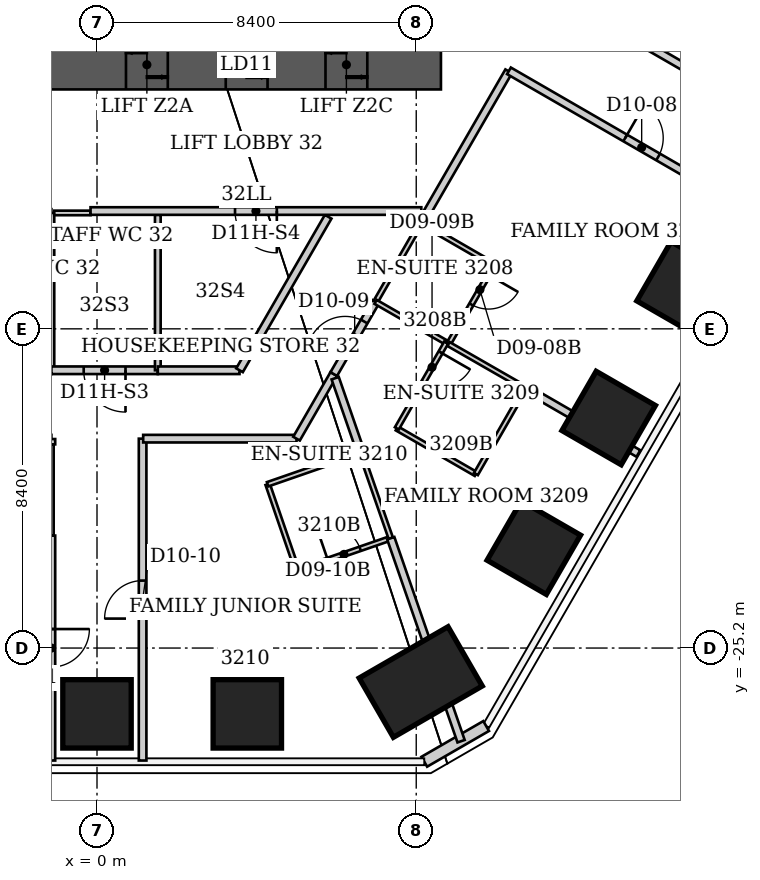
"""IFC4 building model, lengths in metres.
Left out: names, types, materials, properties, quantities, classifications, styles, units other than length and angle.
Written with IfcOpenShell. Run it as: python <this file> out.ifc"""

import sys

from ifc_helpers import new_model, si_unit, direction, frame, frame_2d, origin, origin_2d, place, context, subcontext, project, spatial, rectangle, extrude, element, fill, save


model = new_model("IFC4")
c1 = context("Model", 3, precision=1e-05, world=origin(), true_north=direction((0.0, 1.0)))
c2 = subcontext(c1, "Body", "Model", "MODEL_VIEW")
j1 = project(units=[si_unit("LENGTHUNIT", "METRE"), si_unit("PLANEANGLEUNIT", "RADIAN")], contexts=[c1])
p1 = place(None, origin())
s1 = spatial("IfcSite", under=j1, at=p1, CompositionType="ELEMENT")
p2 = place(p1, origin())
s2 = spatial("IfcBuilding", under=s1, at=p2, CompositionType="ELEMENT")
p3 = place(p2, frame((0.0, 0.0, 131.0)))
s3 = spatial("IfcBuildingStorey", under=s2, at=p3, CompositionType="ELEMENT", Elevation=131.0)
for number, where, z_axis, x_axis in (
    (1, (15.434, -15.735, 0.0), (0.0, 0.0, 1.0), (0.866, -0.5, 0.0)),
    (2, (13.464, -19.147, 0.0), (0.0, 0.0, 1.0), (0.866, -0.5, 0.0)),
    (3, (11.494, -22.559, 0.0), (0.0, 0.0, 1.0), (0.866, -0.5, 0.0)),
):
    element("IfcColumn", number, at=place(p3, frame(where, z_axis=z_axis, x_axis=x_axis)), inside=s3, PredefinedType="COLUMN", context=c2, shape_type="SweptSolid", body=[
        extrude(rectangle(XDim=1.8, YDim=1.8, at=origin_2d()), origin(), (0.0, 0.0, 1.0), 3.8),
    ])
p4 = place(p3, frame((8.518, -26.094, 0.0), z_axis=(0.0, 0.0, 1.0), x_axis=(0.5, -0.866025403784, 0.0)))
e4 = element("IfcColumn", 4, at=p4, inside=s3, PredefinedType="COLUMN", context=c2, shape_type="SweptSolid", body=[
    extrude(rectangle(XDim=1.8, YDim=2.7, at=origin_2d()), origin(), (0.0, 0.0, 1.0), 3.8),
])
for number, where, z_axis, x_axis in (
    (5, (3.955, -26.932, 0.0), (0.0, 0.0, 1.0), (0.0, -1.0, 0.0)),
    (6, (0.0, -26.932, 0.0), (0.0, 0.0, 1.0), (0.0, -1.0, 0.0)),
):
    element("IfcColumn", number, at=place(p3, frame(where, z_axis=z_axis, x_axis=x_axis)), inside=s3, PredefinedType="COLUMN", context=c2, shape_type="SweptSolid", body=[
        extrude(rectangle(XDim=1.8, YDim=1.8, at=origin_2d()), origin(), (0.0, 0.0, 1.0), 3.8),
    ])
p5 = place(p3, frame((-9.05, -9.85, 0.0), z_axis=(0.0, 0.0, 1.0), x_axis=(1.0, 0.0, 0.0)))
e7 = element("IfcWall", 7, at=p5, inside=s3, PredefinedType="SHEAR", context=c2, shape_type="SweptSolid", body=[
    extrude(rectangle(XDim=18.1, YDim=1.3, at=frame_2d((9.05, 0.0))), origin(), (0.0, 0.0, 1.0), 3.8),
])
p6 = place(p5, frame((1.938, 0.0, 0.0)))
e8 = element("IfcOpeningElement", 8, at=p6, cuts=e7, PredefinedType="OPENING", context=c2, shape_type="SweptSolid", body=[
    extrude(rectangle(XDim=1.1, YDim=2.2, at=frame_2d((0.55, 1.1))), frame((0.0, 0.65, 0.0), z_axis=(0.0, -1.0, 0.0), x_axis=(1.0, 0.0, 0.0)), (0.0, 0.0, 1.0), 1.3),
])
p7 = place(p5, frame((9.812, 0.0, 0.0)))
e9 = element("IfcOpeningElement", 9, at=p7, cuts=e7, PredefinedType="OPENING", context=c2, shape_type="SweptSolid", body=[
    extrude(rectangle(XDim=1.1, YDim=2.1, at=frame_2d((0.55, 1.05))), frame((0.0, 0.65, 0.0), z_axis=(0.0, -1.0, 0.0), x_axis=(1.0, 0.0, 0.0)), (0.0, 0.0, 1.0), 1.3),
])
p8 = place(p5, frame((12.438, 0.0, 0.0)))
e10 = element("IfcOpeningElement", 10, at=p8, cuts=e7, PredefinedType="OPENING", context=c2, shape_type="SweptSolid", body=[
    extrude(rectangle(XDim=1.1, YDim=2.1, at=frame_2d((0.55, 1.05))), frame((0.0, 0.65, 0.0), z_axis=(0.0, -1.0, 0.0), x_axis=(1.0, 0.0, 0.0)), (0.0, 0.0, 1.0), 1.3),
])
p9 = place(p5, frame((15.062, 0.0, 0.0)))
e11 = element("IfcOpeningElement", 11, at=p9, cuts=e7, PredefinedType="OPENING", context=c2, shape_type="SweptSolid", body=[
    extrude(rectangle(XDim=1.1, YDim=2.1, at=frame_2d((0.55, 1.05))), frame((0.0, 0.65, 0.0), z_axis=(0.0, -1.0, 0.0), x_axis=(1.0, 0.0, 0.0)), (0.0, 0.0, 1.0), 1.3),
])
p10 = place(p3, frame((10.24, -27.252, 0.0), z_axis=(0.0, 0.0, 1.0), x_axis=(-0.866045024864, -0.499966013754, 0.0)))
e12 = element("IfcWall", 12, at=p10, inside=s3, PredefinedType="SOLIDWALL", context=c2, shape_type="SweptSolid", body=[
    extrude(rectangle(XDim=1.88, YDim=0.3, at=frame_2d((0.94, 0.0))), origin(), (0.0, 0.0, 1.0), 3.64),
])
p11 = place(p3, frame((-1.2, -22.24, 0.0), z_axis=(0.0, 0.0, 1.0), x_axis=(0.0, -1.0, 0.0)))
e13 = element("IfcWall", 13, at=p11, inside=s3, PredefinedType="PARTITIONING", context=c2, shape_type="SweptSolid", body=[
    extrude(rectangle(XDim=5.92, YDim=0.2, at=frame_2d((2.96, 0.0))), origin(), (0.0, 0.0, 1.0), 3.64),
])
p12 = place(p11, frame((2.46, 0.0, 0.0)))
e14 = element("IfcOpeningElement", 14, at=p12, cuts=e13, PredefinedType="OPENING", context=c2, shape_type="SweptSolid", body=[
    extrude(rectangle(XDim=1.0, YDim=2.13, at=frame_2d((0.5, 1.065))), frame((0.0, 0.1, 0.0), z_axis=(0.0, -1.0, 0.0), x_axis=(1.0, 0.0, 0.0)), (0.0, 0.0, 1.0), 0.2),
])
p13 = place(p3, frame((-1.2, -19.84, 0.0), z_axis=(0.0, 0.0, 1.0), x_axis=(0.0, -1.0, 0.0)))
e15 = element("IfcWall", 15, at=p13, inside=s3, PredefinedType="PARTITIONING", context=c2, shape_type="SweptSolid", body=[
    extrude(rectangle(XDim=2.4, YDim=0.12, at=frame_2d((1.2, 0.0))), origin(), (0.0, 0.0, 1.0), 3.64),
])
p14 = place(p3, frame((-1.2, -19.7, 0.0), z_axis=(0.0, 0.0, 1.0), x_axis=(0.0, -1.0, 0.0)))
e16 = element("IfcWall", 16, at=p14, inside=s3, PredefinedType="PARTITIONING", context=c2, shape_type="SweptSolid", body=[
    extrude(rectangle(XDim=0.14, YDim=0.2, at=frame_2d((0.07, 0.0))), origin(), (0.0, 0.0, 1.0), 3.64),
])
p15 = place(p3, frame((-1.2, -13.75, 0.0), z_axis=(0.0, 0.0, 1.0), x_axis=(0.0, -1.0, 0.0)))
e17 = element("IfcWall", 17, at=p15, inside=s3, PredefinedType="PARTITIONING", context=c2, shape_type="SweptSolid", body=[
    extrude(rectangle(XDim=4.14, YDim=0.15, at=frame_2d((2.07, 0.0))), origin(), (0.0, 0.0, 1.0), 3.64),
])
p16 = place(p3, frame((-1.125, -13.75, 0.0), z_axis=(0.0, 0.0, 1.0), x_axis=(1.0, 0.0, 0.0)))
e18 = element("IfcWall", 18, at=p16, inside=s3, PredefinedType="PARTITIONING", context=c2, shape_type="SweptSolid", body=[
    extrude(rectangle(XDim=0.955, YDim=0.12, at=frame_2d((0.478, 0.0))), origin(), (0.0, 0.0, 1.0), 3.64),
])
p17 = place(p3, frame((1.2, -28.16, 0.0), z_axis=(0.0, 0.0, 1.0), x_axis=(0.0, 1.0, 0.0)))
e19 = element("IfcWall", 19, at=p17, inside=s3, PredefinedType="PARTITIONING", context=c2, shape_type="SweptSolid", body=[
    extrude(rectangle(XDim=8.47, YDim=0.2, at=frame_2d((4.235, 0.0))), origin(), (0.0, 0.0, 1.0), 3.64),
])
p18 = place(p17, frame((3.735, 0.0, 0.0)))
e20 = element("IfcOpeningElement", 20, at=p18, cuts=e19, PredefinedType="OPENING", context=c2, shape_type="SweptSolid", body=[
    extrude(rectangle(XDim=1.0, YDim=2.13, at=frame_2d((0.5, 1.065))), frame((0.0, 0.1, 0.0), z_axis=(0.0, -1.0, 0.0), x_axis=(1.0, 0.0, 0.0)), (0.0, 0.0, 1.0), 0.2),
])
p19 = place(p3, frame((1.215, -19.69, 0.0), z_axis=(0.0, 0.0, 1.0), x_axis=(1.0, 0.0, 0.0)))
e21 = element("IfcWall", 21, at=p19, inside=s3, PredefinedType="PARTITIONING", context=c2, shape_type="SweptSolid", body=[
    extrude(rectangle(XDim=4.035, YDim=0.2, at=frame_2d((2.018, 0.0))), origin(), (0.0, 0.0, 1.0), 3.64),
])
p20 = place(p3, frame((1.6, -17.89, 0.0), z_axis=(0.0, 0.0, 1.0), x_axis=(-1.0, 0.0, 0.0)))
e22 = element("IfcWall", 22, at=p20, inside=s3, PredefinedType="PARTITIONING", context=c2, shape_type="SweptSolid", body=[
    extrude(rectangle(XDim=2.8, YDim=0.2, at=frame_2d((1.4, 0.0))), origin(), (0.0, 0.0, 1.0), 3.64),
])
p21 = place(p20, frame((0.85, 0.0, 0.0)))
e23 = element("IfcOpeningElement", 23, at=p21, cuts=e22, PredefinedType="OPENING", context=c2, shape_type="SweptSolid", body=[
    extrude(rectangle(XDim=1.1, YDim=2.2, at=frame_2d((0.55, 1.1))), frame((0.0, 0.1, 0.0), z_axis=(0.0, -1.0, 0.0), x_axis=(1.0, 0.0, 0.0)), (0.0, 0.0, 1.0), 0.2),
])
p22 = place(p3, frame((1.6, -13.8, 0.0), z_axis=(0.0, 0.0, 1.0), x_axis=(0.0, -1.0, 0.0)))
e24 = element("IfcWall", 24, at=p22, inside=s3, PredefinedType="PARTITIONING", context=c2, shape_type="SweptSolid", body=[
    extrude(rectangle(XDim=4.09, YDim=0.15, at=frame_2d((2.045, 0.0))), origin(), (0.0, 0.0, 1.0), 3.64),
])
p23 = place(p3, frame((3.75, -17.89, 0.0), z_axis=(0.0, 0.0, 1.0), x_axis=(-1.0, 0.0, 0.0)))
e25 = element("IfcWall", 25, at=p23, inside=s3, PredefinedType="PARTITIONING", context=c2, shape_type="SweptSolid", body=[
    extrude(rectangle(XDim=2.15, YDim=0.2, at=frame_2d((1.075, 0.0))), origin(), (0.0, 0.0, 1.0), 3.64),
])
p24 = place(p3, frame((4.49, -20.89, 0.0), z_axis=(0.0, 0.0, 1.0), x_axis=(0.324971746724, -0.945723724896, 0.0)))
e26 = element("IfcWall", 26, at=p24, inside=s3, PredefinedType="PARTITIONING", context=c2, shape_type="SweptSolid", body=[
    extrude(rectangle(XDim=2.4, YDim=0.12, at=frame_2d((1.2, 0.0))), origin(), (0.0, 0.0, 1.0), 3.64),
])
p25 = place(p3, frame((5.25, -19.69, 0.0), z_axis=(0.0, 0.0, 1.0), x_axis=(0.499431599995, 0.866353321068, 0.0)))
e27 = element("IfcWall", 27, at=p25, inside=s3, PredefinedType="PARTITIONING", context=c2, shape_type="SweptSolid", body=[
    extrude(rectangle(XDim=1.962, YDim=0.2, at=frame_2d((0.981, 0.0))), origin(), (0.0, 0.0, 1.0), 3.64),
])
p26 = place(p3, frame((5.27, -23.16, 0.0), z_axis=(0.0, 0.0, 1.0), x_axis=(0.945184415197, 0.326537013627, 0.0)))
e28 = element("IfcWall", 28, at=p26, inside=s3, PredefinedType="PARTITIONING", context=c2, shape_type="SweptSolid", body=[
    extrude(rectangle(XDim=2.603, YDim=0.12, at=frame_2d((1.301, 0.0))), origin(), (0.0, 0.0, 1.0), 3.64),
])
p27 = place(p26, frame((0.85, 0.0, 0.0)))
e29 = element("IfcOpeningElement", 29, at=p27, cuts=e28, PredefinedType="OPENING", context=c2, shape_type="SweptSolid", body=[
    extrude(rectangle(XDim=0.9, YDim=2.03, at=frame_2d((0.45, 1.015))), frame((0.0, 0.06, 0.0), z_axis=(0.0, -1.0, 0.0), x_axis=(1.0, 0.0, 0.0)), (0.0, 0.0, 1.0), 0.12),
])
p28 = place(p3, frame((6.083, -13.85, 0.0), z_axis=(0.0, 0.0, 1.0), x_axis=(-0.499977643516, -0.866038310922, 0.0)))
e30 = element("IfcWall", 30, at=p28, inside=s3, PredefinedType="PARTITIONING", context=c2, shape_type="SweptSolid", body=[
    extrude(rectangle(XDim=4.665, YDim=0.2, at=frame_2d((2.333, 0.0))), origin(), (0.0, 0.0, 1.0), 3.64),
])
p29 = place(p3, frame((6.23, -17.99, 0.0), z_axis=(0.0, 0.0, 1.0), x_axis=(0.500957366999, 0.865471961677, 0.0)))
e31 = element("IfcWall", 31, at=p29, inside=s3, PredefinedType="PARTITIONING", context=c2, shape_type="SweptSolid", body=[
    extrude(rectangle(XDim=2.196, YDim=0.2, at=frame_2d((1.098, 0.0))), origin(), (0.0, 0.0, 1.0), 3.64),
])
p30 = place(p29, frame((0.598, 0.0, 0.0)))
e32 = element("IfcOpeningElement", 32, at=p30, cuts=e31, PredefinedType="OPENING", context=c2, shape_type="SweptSolid", body=[
    extrude(rectangle(XDim=1.0, YDim=2.13, at=frame_2d((0.5, 1.065))), frame((0.0, 0.1, 0.0), z_axis=(0.0, -1.0, 0.0), x_axis=(1.0, 0.0, 0.0)), (0.0, 0.0, 1.0), 0.2),
])
p31 = place(p3, frame((6.268, -18.099, 0.0), z_axis=(0.0, 0.0, 1.0), x_axis=(0.327257488288, -0.944935202202, 0.0)))
e33 = element("IfcWall", 33, at=p31, inside=s3, PredefinedType="PARTITIONING", context=c2, shape_type="SweptSolid", body=[
    extrude(rectangle(XDim=2.054, YDim=0.2, at=frame_2d((1.027, 0.0))), origin(), (0.0, 0.0, 1.0), 3.64),
])
p32 = place(p3, frame((6.94, -20.04, 0.0), z_axis=(0.0, 0.0, 1.0), x_axis=(-0.944772080486, -0.327728112822, 0.0)))
e34 = element("IfcWall", 34, at=p32, inside=s3, PredefinedType="PARTITIONING", context=c2, shape_type="SweptSolid", body=[
    extrude(rectangle(XDim=2.593, YDim=0.12, at=frame_2d((1.297, 0.0))), origin(), (0.0, 0.0, 1.0), 3.64),
])
p33 = place(p3, frame((6.94, -20.04, 0.0), z_axis=(0.0, 0.0, 1.0), x_axis=(0.328693963496, -0.944436487203, 0.0)))
e35 = element("IfcWall", 35, at=p33, inside=s3, PredefinedType="PARTITIONING", context=c2, shape_type="SweptSolid", body=[
    extrude(rectangle(XDim=2.404, YDim=0.12, at=frame_2d((1.202, 0.0))), origin(), (0.0, 0.0, 1.0), 3.64),
])
p34 = place(p3, frame((7.33, -16.09, 0.0), z_axis=(0.0, 0.0, 1.0), x_axis=(0.498475244549, 0.866903933877, 0.0)))
e36 = element("IfcWall", 36, at=p34, inside=s3, PredefinedType="PARTITIONING", context=c2, shape_type="SweptSolid", body=[
    extrude(rectangle(XDim=2.227, YDim=0.12, at=frame_2d((1.113, 0.0))), origin(), (0.0, 0.0, 1.0), 3.64),
])
p35 = place(p3, frame((7.33, -16.09, 0.0), z_axis=(0.0, 0.0, 1.0), x_axis=(0.866825160608, -0.498612214989, 0.0)))
e37 = element("IfcWall", 37, at=p35, inside=s3, PredefinedType="PARTITIONING", context=c2, shape_type="SweptSolid", body=[
    extrude(rectangle(XDim=2.146, YDim=0.12, at=frame_2d((1.073, 0.0))), origin(), (0.0, 0.0, 1.0), 3.64),
])
p36 = place(p3, frame((7.73, -22.31, 0.0), z_axis=(0.0, 0.0, 1.0), x_axis=(0.327284111977, -0.944925981253, 0.0)))
e38 = element("IfcWall", 38, at=p36, inside=s3, PredefinedType="PARTITIONING", context=c2, shape_type="SweptSolid", body=[
    extrude(rectangle(XDim=5.653, YDim=0.2, at=frame_2d((2.826, 0.0))), origin(), (0.0, 0.0, 1.0), 3.64),
])
p37 = place(p3, frame((7.89, -19.42, 0.0), z_axis=(0.0, 0.0, 1.0), x_axis=(0.866202511239, -0.499693115345, 0.0)))
e39 = element("IfcWall", 39, at=p37, inside=s3, PredefinedType="PARTITIONING", context=c2, shape_type="SweptSolid", body=[
    extrude(rectangle(XDim=2.401, YDim=0.12, at=frame_2d((1.201, 0.0))), origin(), (0.0, 0.0, 1.0), 3.64),
])
p38 = place(p3, frame((8.44, -14.16, 0.0), z_axis=(0.0, 0.0, 1.0), x_axis=(0.515111490125, 0.857123184111, 0.0)))
e40 = element("IfcWall", 40, at=p38, inside=s3, PredefinedType="PARTITIONING", context=c2, shape_type="SweptSolid", body=[
    extrude(rectangle(XDim=0.175, YDim=0.12, at=frame_2d((0.087, 0.0))), origin(), (0.0, 0.0, 1.0), 3.64),
])
p39 = place(p3, frame((8.53, -14.01, 0.0), z_axis=(0.0, 0.0, 1.0), x_axis=(0.500091179446, 0.865972754907, 0.0)))
e41 = element("IfcWall", 41, at=p39, inside=s3, PredefinedType="PARTITIONING", context=c2, shape_type="SweptSolid", body=[
    extrude(rectangle(XDim=4.604, YDim=0.2, at=frame_2d((2.302, 0.0))), origin(), (0.0, 0.0, 1.0), 3.64),
])
p40 = place(p3, frame((8.534, -13.7, 0.0), z_axis=(0.0, 0.0, 1.0), x_axis=(-1.0, 0.0, 0.0)))
e42 = element("IfcWall", 42, at=p40, inside=s3, PredefinedType="PARTITIONING", context=c2, shape_type="SweptSolid", body=[
    extrude(rectangle(XDim=8.704, YDim=0.2, at=frame_2d((4.352, 0.0))), origin(), (0.0, 0.0, 1.0), 3.64),
])
p41 = place(p40, frame((3.802, 0.0, 0.0)))
e43 = element("IfcOpeningElement", 43, at=p41, cuts=e42, PredefinedType="OPENING", context=c2, shape_type="SweptSolid", body=[
    extrude(rectangle(XDim=1.1, YDim=2.2, at=frame_2d((0.55, 1.1))), frame((0.0, 0.1, 0.0), z_axis=(0.0, -1.0, 0.0), x_axis=(1.0, 0.0, 0.0)), (0.0, 0.0, 1.0), 0.2),
])
p42 = place(p3, frame((9.19, -17.16, 0.0), z_axis=(0.0, 0.0, 1.0), x_axis=(-0.498627694264, -0.866816256489, 0.0)))
e44 = element("IfcWall", 44, at=p42, inside=s3, PredefinedType="PARTITIONING", context=c2, shape_type="SweptSolid", body=[
    extrude(rectangle(XDim=2.607, YDim=0.12, at=frame_2d((1.304, 0.0))), origin(), (0.0, 0.0, 1.0), 3.64),
])
p43 = place(p42, frame((0.3, 0.0, 0.0)))
e45 = element("IfcOpeningElement", 45, at=p43, cuts=e44, PredefinedType="OPENING", context=c2, shape_type="SweptSolid", body=[
    extrude(rectangle(XDim=0.9, YDim=2.03, at=frame_2d((0.45, 1.015))), frame((0.0, 0.06, 0.0), z_axis=(0.0, -1.0, 0.0), x_axis=(1.0, 0.0, 0.0)), (0.0, 0.0, 1.0), 0.12),
])
p44 = place(p3, frame((9.25, -17.2, 0.0), z_axis=(0.0, 0.0, 1.0), x_axis=(0.499737123639, 0.866177122335, 0.0)))
e46 = element("IfcWall", 46, at=p44, inside=s3, PredefinedType="PARTITIONING", context=c2, shape_type="SweptSolid", body=[
    extrude(rectangle(XDim=2.401, YDim=0.12, at=frame_2d((1.201, 0.0))), origin(), (0.0, 0.0, 1.0), 3.64),
])
p45 = place(p44, frame((1.201, 0.0, 0.0)))
e47 = element("IfcOpeningElement", 47, at=p45, cuts=e46, PredefinedType="OPENING", context=c2, shape_type="SweptSolid", body=[
    extrude(rectangle(XDim=0.9, YDim=2.03, at=frame_2d((0.45, 1.015))), frame((0.0, 0.06, 0.0), z_axis=(0.0, -1.0, 0.0), x_axis=(1.0, 0.0, 0.0)), (0.0, 0.0, 1.0), 0.12),
])
p46 = place(p3, frame((9.25, -17.2, 0.0), z_axis=(0.0, 0.0, 1.0), x_axis=(0.867157547908, -0.498033921641, 0.0)))
e48 = element("IfcWall", 48, at=p46, inside=s3, PredefinedType="PARTITIONING", context=c2, shape_type="SweptSolid", body=[
    extrude(rectangle(XDim=2.33, YDim=0.12, at=frame_2d((1.165, 0.0))), origin(), (0.0, 0.0, 1.0), 3.64),
])
p47 = place(p3, frame((9.97, -20.62, 0.0), z_axis=(0.0, 0.0, 1.0), x_axis=(0.498627694264, 0.866816256489, 0.0)))
e49 = element("IfcWall", 49, at=p47, inside=s3, PredefinedType="PARTITIONING", context=c2, shape_type="SweptSolid", body=[
    extrude(rectangle(XDim=2.607, YDim=0.12, at=frame_2d((1.304, 0.0))), origin(), (0.0, 0.0, 1.0), 3.64),
])
p48 = place(p3, frame((10.45, -15.12, 0.0), z_axis=(0.0, 0.0, 1.0), x_axis=(-0.865705017107, 0.500554515868, 0.0)))
e50 = element("IfcWall", 50, at=p48, inside=s3, PredefinedType="PARTITIONING", context=c2, shape_type="SweptSolid", body=[
    extrude(rectangle(XDim=2.218, YDim=0.12, at=frame_2d((1.109, 0.0))), origin(), (0.0, 0.0, 1.0), 3.023),
])
p49 = place(p3, frame((10.84, -10.01, 0.0), z_axis=(0.0, 0.0, 1.0), x_axis=(0.86587701925, -0.500256921525, 0.0)))
e51 = element("IfcWall", 51, at=p49, inside=s3, PredefinedType="PARTITIONING", context=c2, shape_type="SweptSolid", body=[
    extrude(rectangle(XDim=8.066, YDim=0.2, at=frame_2d((4.033, 0.0))), origin(), (0.0, 0.0, 1.0), 3.64),
])
p50 = place(p49, frame((3.533, 0.0, 0.0)))
e52 = element("IfcOpeningElement", 52, at=p50, cuts=e51, PredefinedType="OPENING", context=c2, shape_type="SweptSolid", body=[
    extrude(rectangle(XDim=1.0, YDim=2.13, at=frame_2d((0.5, 1.065))), frame((0.0, 0.1, 0.0), z_axis=(0.0, -1.0, 0.0), x_axis=(1.0, 0.0, 0.0)), (0.0, 0.0, 1.0), 0.2),
])
p51 = place(p3, frame((11.27, -18.36, 0.0), z_axis=(0.0, 0.0, 1.0), x_axis=(0.865806952829, -0.500378177414, 0.0)))
e53 = element("IfcWall", 53, at=p51, inside=s3, PredefinedType="PARTITIONING", context=c2, shape_type="SweptSolid", body=[
    extrude(rectangle(XDim=3.437, YDim=0.2, at=frame_2d((1.719, 0.0))), origin(), (0.0, 0.0, 1.0), 3.64),
])
p52 = place(p3, frame((13.96, -9.05, 0.0), z_axis=(0.0, 0.0, 1.0), x_axis=(0.865934584664, -0.500157270349, 0.0)))
e54 = element("IfcWall", 54, at=p52, inside=s3, PredefinedType="PARTITIONING", context=c2, shape_type="SweptSolid", body=[
    extrude(rectangle(XDim=5.848, YDim=0.2, at=frame_2d((2.924, 0.0))), origin(), (0.0, 0.0, 1.0), 3.64),
])
p53 = place(p50, origin())
e55 = element("IfcDoor", 55, at=p53, inside=s3, OperationType="SINGLE_SWING_LEFT", PredefinedType="DOOR", context=c2, shape_type="SweptSolid", body=[
    extrude(rectangle(XDim=1.0, YDim=2.13, at=frame_2d((0.5, 1.065))), frame((0.0, 0.025, 0.0), z_axis=(0.0, -1.0, 0.0), x_axis=(1.0, 0.0, 0.0)), (0.0, 0.0, 1.0), 0.05),
])
fill(e52, e55)
p54 = place(p45, origin())
e56 = element("IfcDoor", 56, at=p54, inside=s3, OperationType="SINGLE_SWING_RIGHT", PredefinedType="DOOR", context=c2, shape_type="SweptSolid", body=[
    extrude(rectangle(XDim=0.9, YDim=2.03, at=frame_2d((0.45, 1.015))), frame((0.0, 0.025, 0.0), z_axis=(0.0, -1.0, 0.0), x_axis=(1.0, 0.0, 0.0)), (0.0, 0.0, 1.0), 0.05),
])
fill(e47, e56)
p55 = place(p30, origin())
e57 = element("IfcDoor", 57, at=p55, inside=s3, OperationType="SINGLE_SWING_LEFT", PredefinedType="DOOR", context=c2, shape_type="SweptSolid", body=[
    extrude(rectangle(XDim=1.0, YDim=2.13, at=frame_2d((0.5, 1.065))), frame((0.0, 0.025, 0.0), z_axis=(0.0, -1.0, 0.0), x_axis=(1.0, 0.0, 0.0)), (0.0, 0.0, 1.0), 0.05),
])
fill(e32, e57)
p56 = place(p43, origin())
e58 = element("IfcDoor", 58, at=p56, inside=s3, OperationType="SINGLE_SWING_LEFT", PredefinedType="DOOR", context=c2, shape_type="SweptSolid", body=[
    extrude(rectangle(XDim=0.9, YDim=2.03, at=frame_2d((0.45, 1.015))), frame((0.0, 0.025, 0.0), z_axis=(0.0, -1.0, 0.0), x_axis=(1.0, 0.0, 0.0)), (0.0, 0.0, 1.0), 0.05),
])
fill(e45, e58)
p57 = place(p18, origin())
e59 = element("IfcDoor", 59, at=p57, inside=s3, OperationType="SINGLE_SWING_LEFT", PredefinedType="DOOR", context=c2, shape_type="SweptSolid", body=[
    extrude(rectangle(XDim=1.0, YDim=2.13, at=frame_2d((0.5, 1.065))), frame((0.0, 0.025, 0.0), z_axis=(0.0, -1.0, 0.0), x_axis=(1.0, 0.0, 0.0)), (0.0, 0.0, 1.0), 0.05),
])
fill(e20, e59)
p58 = place(p27, origin())
e60 = element("IfcDoor", 60, at=p58, inside=s3, OperationType="SINGLE_SWING_LEFT", PredefinedType="DOOR", context=c2, shape_type="SweptSolid", body=[
    extrude(rectangle(XDim=0.9, YDim=2.03, at=frame_2d((0.45, 1.015))), frame((0.0, 0.025, 0.0), z_axis=(0.0, -1.0, 0.0), x_axis=(1.0, 0.0, 0.0)), (0.0, 0.0, 1.0), 0.05),
])
fill(e29, e60)
p59 = place(p21, origin())
e61 = element("IfcDoor", 61, at=p59, inside=s3, OperationType="SINGLE_SWING_LEFT", PredefinedType="DOOR", context=c2, shape_type="SweptSolid", body=[
    extrude(rectangle(XDim=1.1, YDim=2.2, at=frame_2d((0.55, 1.1))), frame((0.0, 0.025, 0.0), z_axis=(0.0, -1.0, 0.0), x_axis=(1.0, 0.0, 0.0)), (0.0, 0.0, 1.0), 0.05),
])
fill(e23, e61)
p60 = place(p41, origin())
e62 = element("IfcDoor", 62, at=p60, inside=s3, OperationType="SINGLE_SWING_LEFT", PredefinedType="DOOR", context=c2, shape_type="SweptSolid", body=[
    extrude(rectangle(XDim=1.1, YDim=2.2, at=frame_2d((0.55, 1.1))), frame((0.0, 0.025, 0.0), z_axis=(0.0, -1.0, 0.0), x_axis=(1.0, 0.0, 0.0)), (0.0, 0.0, 1.0), 0.05),
])
fill(e43, e62)
p61 = place(p7, origin())
e63 = element("IfcDoor", 63, at=p61, inside=s3, OperationType="DOUBLE_DOOR_SLIDING", PredefinedType="DOOR", context=c2, shape_type="SweptSolid", body=[
    extrude(rectangle(XDim=1.1, YDim=2.1, at=frame_2d((0.55, 1.05))), frame((0.0, 0.025, 0.0), z_axis=(0.0, -1.0, 0.0), x_axis=(1.0, 0.0, 0.0)), (0.0, 0.0, 1.0), 0.05),
])
fill(e9, e63)
p62 = place(p8, origin())
e64 = element("IfcDoor", 64, at=p62, inside=s3, OperationType="DOUBLE_DOOR_SLIDING", PredefinedType="DOOR", context=c2, shape_type="SweptSolid", body=[
    extrude(rectangle(XDim=1.1, YDim=2.1, at=frame_2d((0.55, 1.05))), frame((0.0, 0.025, 0.0), z_axis=(0.0, -1.0, 0.0), x_axis=(1.0, 0.0, 0.0)), (0.0, 0.0, 1.0), 0.05),
])
fill(e10, e64)
p63 = place(p9, origin())
e65 = element("IfcDoor", 65, at=p63, inside=s3, OperationType="DOUBLE_DOOR_SLIDING", PredefinedType="DOOR", context=c2, shape_type="SweptSolid", body=[
    extrude(rectangle(XDim=1.1, YDim=2.1, at=frame_2d((0.55, 1.05))), frame((0.0, 0.025, 0.0), z_axis=(0.0, -1.0, 0.0), x_axis=(1.0, 0.0, 0.0)), (0.0, 0.0, 1.0), 0.05),
])
fill(e11, e65)
save(model, sys.argv[1])
